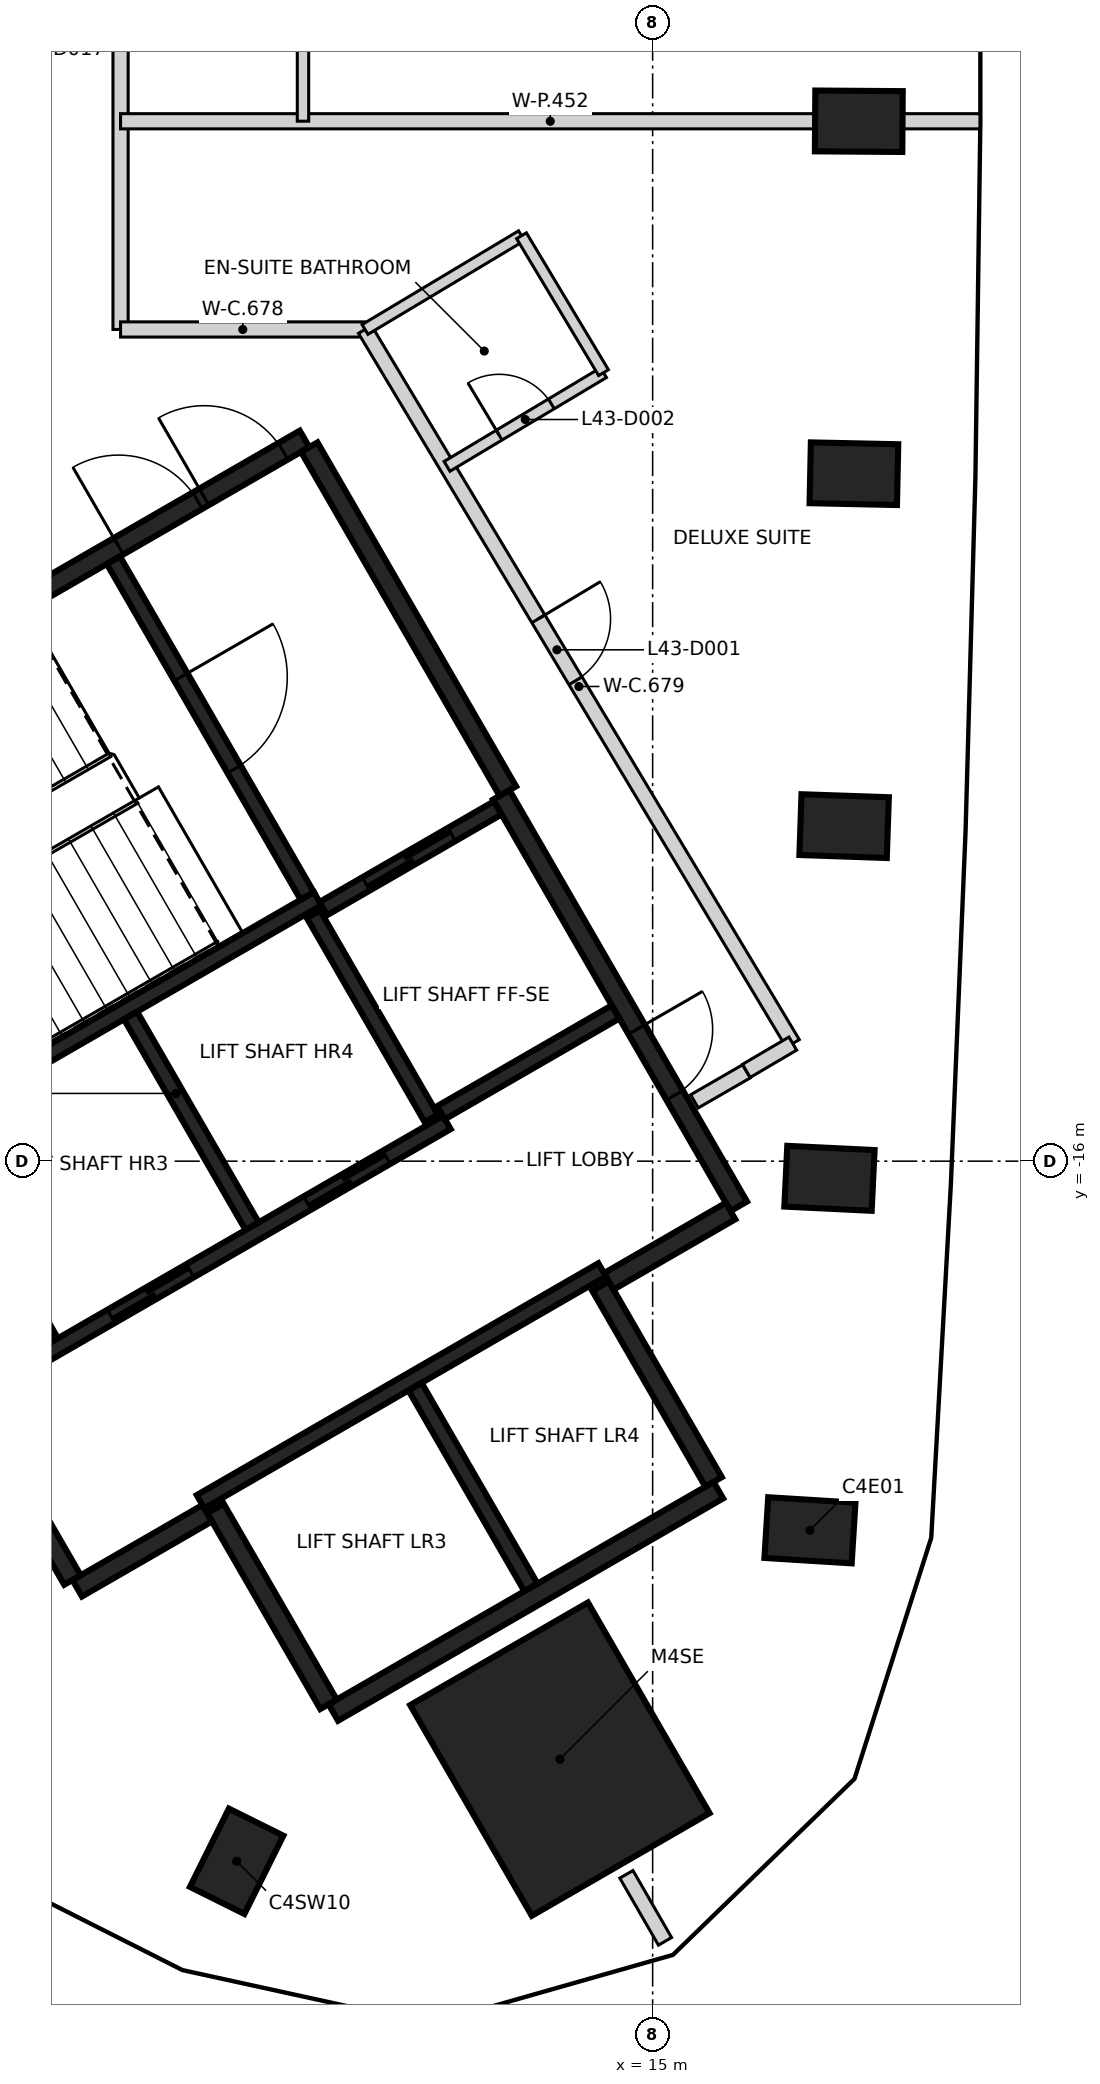
"""IFC4 building model, lengths in metres.
Left out: names, types, materials, properties, quantities, classifications, styles, units other than length and angle.
Written with IfcOpenShell. Run it as: python <this file> out.ifc"""

import sys

from ifc_helpers import new_model, si_unit, direction, frame, frame_2d, origin, origin_2d, place, context, subcontext, project, spatial, rectangle, extrude, element, fill, save


model = new_model("IFC4")
c1 = context("Model", 3, precision=1e-05, world=origin(), true_north=direction((0.0, 1.0)))
c2 = subcontext(c1, "Body", "Model", "MODEL_VIEW")
j1 = project(units=[si_unit("LENGTHUNIT", "METRE"), si_unit("PLANEANGLEUNIT", "RADIAN")], contexts=[c1])
p1 = place(None, origin())
s1 = spatial("IfcSite", under=j1, at=p1, CompositionType="ELEMENT")
p2 = place(p1, origin())
s2 = spatial("IfcBuilding", under=s1, at=p2, CompositionType="ELEMENT")
p3 = place(p2, frame((0.0, 0.0, 175.6)))
s3 = spatial("IfcBuildingStorey", under=s2, at=p3, CompositionType="ELEMENT", Elevation=175.6)
for number, where, z_axis, x_axis in (
    (1, (17.07, -20.856, -0.35), (0.0, 0.0, 1.0), (-0.998, 0.062, 0.0)),
    (2, (17.326, -16.226, -0.35), (0.0, 0.0, 1.0), (-0.999, 0.048, 0.0)),
    (3, (17.519, -11.592, -0.35), (0.0, 0.0, 1.0), (-0.999, 0.034, 0.0)),
    (4, (17.648, -6.956, -0.35), (0.0, 0.0, 1.0), (-1.0, 0.021, 0.0)),
    (5, (17.712, -2.319, -0.35), (0.0, 0.0, 1.0), (-1.0, 0.007, 0.0)),
    (6, (9.527, -25.211, -0.35), (0.0, 0.0, 1.0), (0.445, 0.895, 0.0)),
):
    element("IfcColumn", number, at=place(p3, frame(where, z_axis=z_axis, x_axis=x_axis)), inside=s3, PredefinedType="COLUMN", context=c2, shape_type="SweptSolid", body=[
        extrude(rectangle(XDim=1.15, YDim=0.8, at=origin_2d()), origin(), (0.0, 0.0, 1.0), 3.6),
    ])
p4 = place(p3, frame((13.78, -23.867, -0.35), z_axis=(0.0, 0.0, 1.0), x_axis=(-0.5, 0.866025403784, 0.0)))
e7 = element("IfcColumn", 7, at=p4, inside=s3, PredefinedType="COLUMN", context=c2, shape_type="SweptSolid", body=[
    extrude(rectangle(XDim=3.2, YDim=2.7, at=origin_2d()), origin(), (0.0, 0.0, 1.0), 3.6),
])
p5 = place(p3, frame((0.417, -12.273, 0.0), z_axis=(0.0, 0.0, 1.0), x_axis=(0.866021906294, 0.500006057782, 0.0)))
e8 = element("IfcWall", 8, at=p5, inside=s3, PredefinedType="SHEAR", context=c2, shape_type="SweptSolid", body=[
    extrude(rectangle(XDim=11.55, YDim=0.25, at=frame_2d((5.775, 0.0))), origin(), (0.0, 0.0, 1.0), 3.25),
])
p6 = place(p5, frame((10.025, 0.0, 0.0)))
e9 = element("IfcOpeningElement", 9, at=p6, cuts=e8, PredefinedType="OPENING", context=c2, shape_type="SweptSolid", body=[
    extrude(rectangle(XDim=1.2, YDim=2.1, at=frame_2d((0.6, 1.05))), frame((0.0, 0.135, 0.0), z_axis=(0.0, -1.0, 0.0), x_axis=(1.0, 0.0, 0.0)), (0.0, 0.0, 1.0), 0.27),
])
p7 = place(p5, frame((8.725, 0.0, 0.0)))
e10 = element("IfcOpeningElement", 10, at=p7, cuts=e8, PredefinedType="OPENING", context=c2, shape_type="SweptSolid", body=[
    extrude(rectangle(XDim=1.2, YDim=2.1, at=frame_2d((0.6, 1.05))), frame((0.0, 0.135, 0.0), z_axis=(0.0, -1.0, 0.0), x_axis=(1.0, 0.0, 0.0)), (0.0, 0.0, 1.0), 0.27),
])
p8 = place(p3, frame((13.008, -11.181, 0.0), z_axis=(0.0, 0.0, 1.0), x_axis=(0.500004234368, -0.866022959057, 0.0)))
e11 = element("IfcWall", 11, at=p8, inside=s3, PredefinedType="SHEAR", context=c2, shape_type="SweptSolid", body=[
    extrude(rectangle(XDim=6.25, YDim=0.25, at=frame_2d((3.125, 0.0))), origin(), (0.0, 0.0, 1.0), 3.25),
])
p9 = place(p8, frame((3.563, 0.0, 0.0)))
e12 = element("IfcOpeningElement", 12, at=p9, cuts=e11, PredefinedType="OPENING", context=c2, shape_type="SweptSolid", body=[
    extrude(rectangle(XDim=1.0, YDim=2.1, at=frame_2d((0.5, 1.05))), frame((0.0, 0.135, 0.0), z_axis=(0.0, -1.0, 0.0), x_axis=(1.0, 0.0, 0.0)), (0.0, 0.0, 1.0), 0.27),
])
p10 = place(p3, frame((15.865, -20.328, 0.0), z_axis=(0.0, 0.0, 1.0), x_axis=(-0.86602852612, -0.499994591916, 0.0)))
e13 = element("IfcWall", 13, at=p10, inside=s3, PredefinedType="SHEAR", context=c2, shape_type="SweptSolid", body=[
    extrude(rectangle(XDim=5.85, YDim=0.25, at=frame_2d((2.925, 0.0))), origin(), (0.0, 0.0, 1.0), 3.25),
])
p11 = place(p3, frame((10.483, -6.606, 0.0), z_axis=(0.0, 0.0, 1.0), x_axis=(0.49999885962, -0.866026062182, 0.0)))
e14 = element("IfcWall", 14, at=p11, inside=s3, PredefinedType="SHEAR", context=c2, shape_type="SweptSolid", body=[
    extrude(rectangle(XDim=5.225, YDim=0.25, at=frame_2d((2.612, 0.0))), origin(), (0.0, 0.0, 1.0), 3.25),
])
p12 = place(p3, frame((7.031, -18.327, 0.0), z_axis=(0.0, 0.0, 1.0), x_axis=(-0.499971222258, 0.866042017984, 0.0)))
e15 = element("IfcWall", 15, at=p12, inside=s3, PredefinedType="SHEAR", context=c2, shape_type="SweptSolid", body=[
    extrude(rectangle(XDim=3.2, YDim=0.25, at=frame_2d((1.6, 0.0))), origin(), (0.0, 0.0, 1.0), 3.25),
])
for number, where, z_axis, x_axis in (
    (16, (14.315, -17.644, 0.0), (0.0, 0.0, 1.0), (0.5, -0.866, 0.0)),
    (17, (10.736, -23.145, 0.0), (0.0, 0.0, 1.0), (-0.5, 0.866, 0.0)),
):
    element("IfcWall", number, at=place(p3, frame(where, z_axis=z_axis, x_axis=x_axis)), inside=s3, PredefinedType="SHEAR", context=c2, shape_type="SweptSolid", body=[
        extrude(rectangle(XDim=2.974, YDim=0.25, at=frame_2d((1.487, 0.0))), origin(), (0.0, 0.0, 1.0), 3.25),
    ])
p13 = place(p3, frame((9.14, -20.631, 0.0), z_axis=(0.0, 0.0, 1.0), x_axis=(-0.866043531843, -0.499968599967, 0.0)))
e18 = element("IfcWall", 18, at=p13, inside=s3, PredefinedType="SHEAR", context=c2, shape_type="SweptSolid", body=[
    extrude(rectangle(XDim=1.975, YDim=0.25, at=frame_2d((0.987, 0.0))), origin(), (0.0, 0.0, 1.0), 3.25),
])
p14 = place(p3, frame((16.025, -16.656, 0.0), z_axis=(0.0, 0.0, 1.0), x_axis=(-0.866016279763, -0.500015802937, 0.0)))
e19 = element("IfcWall", 19, at=p14, inside=s3, PredefinedType="SHEAR", context=c2, shape_type="SweptSolid", body=[
    extrude(rectangle(XDim=1.849, YDim=0.25, at=frame_2d((0.925, 0.0))), origin(), (0.0, 0.0, 1.0), 3.25),
])
p15 = place(p3, frame((7.367, -21.51, 0.0), z_axis=(0.0, 0.0, 1.0), x_axis=(-0.499983108224, 0.866035156036, 0.0)))
e20 = element("IfcWall", 20, at=p15, inside=s3, PredefinedType="SHEAR", context=c2, shape_type="SweptSolid", body=[
    extrude(rectangle(XDim=1.865, YDim=0.25, at=frame_2d((0.932, 0.0))), origin(), (0.0, 0.0, 1.0), 3.25),
])
p16 = place(p3, frame((9.052, -20.48, 0.0), z_axis=(0.0, 0.0, 1.0), x_axis=(0.866030299012, 0.499991521122, 0.0)))
e21 = element("IfcWall", 21, at=p16, inside=s3, PredefinedType="SHEAR", context=c2, shape_type="SweptSolid", body=[
    extrude(rectangle(XDim=6.1, YDim=0.2, at=frame_2d((3.05, 0.0))), origin(), (0.0, 0.0, 1.0), 3.25),
])
p17 = place(p3, frame((5.526, -15.472, 0.0), z_axis=(0.0, 0.0, 1.0), x_axis=(0.866041752167, 0.499971682701, 0.0)))
e22 = element("IfcWall", 22, at=p17, inside=s3, PredefinedType="SHEAR", context=c2, shape_type="SweptSolid", body=[
    extrude(rectangle(XDim=5.851, YDim=0.2, at=frame_2d((2.925, 0.0))), origin(), (0.0, 0.0, 1.0), 3.25),
])
p18 = place(p3, frame((12.293, -15.491, 0.0), z_axis=(0.0, 0.0, 1.0), x_axis=(-0.866030299012, -0.499991521122, 0.0)))
e23 = element("IfcWall", 23, at=p18, inside=s3, PredefinedType="SHEAR", context=c2, shape_type="SweptSolid", body=[
    extrude(rectangle(XDim=6.1, YDim=0.2, at=frame_2d((3.05, 0.0))), origin(), (0.0, 0.0, 1.0), 3.25),
])
p19 = place(p18, frame((3.9, 0.0, 0.0)))
e24 = element("IfcOpeningElement", 24, at=p19, cuts=e23, PredefinedType="OPENING", context=c2, shape_type="SweptSolid", body=[
    extrude(rectangle(XDim=1.2, YDim=2.1, at=frame_2d((0.6, 1.05))), frame((0.0, 0.11, 0.0), z_axis=(0.0, -1.0, 0.0), x_axis=(1.0, 0.0, 0.0)), (0.0, 0.0, 1.0), 0.22),
])
p20 = place(p18, frame((0.918, 0.0, 0.0)))
e25 = element("IfcOpeningElement", 25, at=p20, cuts=e23, PredefinedType="OPENING", context=c2, shape_type="SweptSolid", body=[
    extrude(rectangle(XDim=1.2, YDim=2.1, at=frame_2d((0.6, 1.05))), frame((0.0, 0.11, 0.0), z_axis=(0.0, -1.0, 0.0), x_axis=(1.0, 0.0, 0.0)), (0.0, 0.0, 1.0), 0.22),
])
p21 = place(p3, frame((7.906, -8.094, 0.0), z_axis=(0.0, 0.0, 1.0), x_axis=(0.500027839223, -0.866009330205, 0.0)))
e26 = element("IfcWall", 26, at=p21, inside=s3, PredefinedType="SHEAR", context=c2, shape_type="SweptSolid", body=[
    extrude(rectangle(XDim=5.098, YDim=0.2, at=frame_2d((2.549, 0.0))), origin(), (0.0, 0.0, 1.0), 3.25),
])
p22 = place(p21, frame((1.774, 0.0, 0.0)))
e27 = element("IfcOpeningElement", 27, at=p22, cuts=e26, PredefinedType="OPENING", context=c2, shape_type="SweptSolid", body=[
    extrude(rectangle(XDim=1.4, YDim=2.1, at=frame_2d((0.7, 1.05))), frame((0.0, 0.11, 0.0), z_axis=(0.0, -1.0, 0.0), x_axis=(1.0, 0.0, 0.0)), (0.0, 0.0, 1.0), 0.22),
])
p23 = place(p3, frame((8.132, -14.084, 0.0), z_axis=(0.0, 0.0, 1.0), x_axis=(0.499997778408, -0.866026686418, 0.0)))
e28 = element("IfcWall", 28, at=p23, inside=s3, PredefinedType="SHEAR", context=c2, shape_type="SweptSolid", body=[
    extrude(rectangle(XDim=3.198, YDim=0.2, at=frame_2d((1.599, 0.0))), origin(), (0.0, 0.0, 1.0), 3.25),
])
p24 = place(p3, frame((11.875, -18.967, 0.0), z_axis=(0.0, 0.0, 1.0), x_axis=(0.49998131003, -0.866036194175, 0.0)))
e29 = element("IfcWall", 29, at=p24, inside=s3, PredefinedType="SHEAR", context=c2, shape_type="SweptSolid", body=[
    extrude(rectangle(XDim=3.048, YDim=0.2, at=frame_2d((1.524, 0.0))), origin(), (0.0, 0.0, 1.0), 3.25),
])
p25 = place(p3, frame((12.088, -15.437, 0.0), z_axis=(0.0, 0.0, 1.0), x_axis=(-0.500026960575, 0.86600983753, 0.0)))
e30 = element("IfcWall", 30, at=p25, inside=s3, PredefinedType="SHEAR", context=c2, shape_type="SweptSolid", body=[
    extrude(rectangle(XDim=3.1, YDim=0.2, at=frame_2d((1.55, 0.0))), origin(), (0.0, 0.0, 1.0), 3.25),
])
p26 = place(p3, frame((10.666, -12.678, 0.0), z_axis=(0.0, 0.0, 1.0), x_axis=(0.866018407898, 0.500012117035, 0.0)))
e31 = element("IfcWall", 31, at=p26, inside=s3, PredefinedType="SHEAR", context=c2, shape_type="SweptSolid", body=[
    extrude(rectangle(XDim=2.651, YDim=0.2, at=frame_2d((1.325, 0.0))), origin(), (0.0, 0.0, 1.0), 3.25),
])
p27 = place(p26, frame((0.652, 0.0, 0.0)))
e32 = element("IfcOpeningElement", 32, at=p27, cuts=e31, PredefinedType="OPENING", context=c2, shape_type="SweptSolid", body=[
    extrude(rectangle(XDim=1.3, YDim=2.1, at=frame_2d((0.65, 1.05))), frame((0.0, 0.11, 0.0), z_axis=(0.0, -1.0, 0.0), x_axis=(1.0, 0.0, 0.0)), (0.0, 0.0, 1.0), 0.22),
])
p28 = place(p3, frame((14.512, -14.037, 0.0), z_axis=(0.0, 0.0, 1.0), x_axis=(-0.866018407898, -0.500012117035, 0.0)))
e33 = element("IfcWall", 33, at=p28, inside=s3, PredefinedType="SHEAR", context=c2, shape_type="SweptSolid", body=[
    extrude(rectangle(XDim=2.651, YDim=0.2, at=frame_2d((1.325, 0.0))), origin(), (0.0, 0.0, 1.0), 3.25),
])
p29 = place(p3, frame((8.0, -5.058, 0.0), z_axis=(0.0, 0.0, 1.0), x_axis=(0.0, 1.0, 0.0)))
e34 = element("IfcWall", 34, at=p29, inside=s3, PredefinedType="PARTITIONING", context=c2, shape_type="SweptSolid", body=[
    extrude(rectangle(XDim=12.74, YDim=0.2, at=frame_2d((6.37, 0.0))), origin(), (0.0, 0.0, 1.0), 3.25),
])
p30 = place(p29, frame((9.508, 0.0, 0.0)))
e35 = element("IfcOpeningElement", 35, at=p30, cuts=e34, PredefinedType="OPENING", context=c2, shape_type="SweptSolid", body=[
    extrude(rectangle(XDim=0.95, YDim=2.1, at=frame_2d((0.475, 1.05))), frame((0.0, 0.11, 0.0), z_axis=(0.0, -1.0, 0.0), x_axis=(1.0, 0.0, 0.0)), (0.0, 0.0, 1.0), 0.22),
])
p31 = place(p3, frame((8.0, -5.058, 0.0), z_axis=(0.0, 0.0, 1.0), x_axis=(1.0, 0.0, 0.0)))
e36 = element("IfcWall", 36, at=p31, inside=s3, PredefinedType="PARTITIONING", context=c2, shape_type="SweptSolid", body=[
    extrude(rectangle(XDim=3.216, YDim=0.2, at=frame_2d((1.608, 0.0))), origin(), (0.0, 0.0, 1.0), 3.25),
])
p32 = place(p3, frame((11.216, -5.058, 0.0), z_axis=(0.0, 0.0, 1.0), x_axis=(0.51393500197, -0.857829128527, 0.0)))
e37 = element("IfcWall", 37, at=p32, inside=s3, PredefinedType="PARTITIONING", context=c2, shape_type="SweptSolid", body=[
    extrude(rectangle(XDim=10.951, YDim=0.2, at=frame_2d((5.475, 0.0))), origin(), (0.0, 0.0, 1.0), 3.25),
])
p33 = place(p32, frame((4.438, 0.0, 0.0)))
e38 = element("IfcOpeningElement", 38, at=p33, cuts=e37, PredefinedType="OPENING", context=c2, shape_type="SweptSolid", body=[
    extrude(rectangle(XDim=0.95, YDim=2.1, at=frame_2d((0.475, 1.05))), frame((0.0, 0.11, 0.0), z_axis=(0.0, -1.0, 0.0), x_axis=(1.0, 0.0, 0.0)), (0.0, 0.0, 1.0), 0.22),
])
p34 = place(p3, frame((15.55, -15.213, 0.0), z_axis=(0.0, 0.0, 1.0), x_axis=(0.865989998118, 0.500061319399, 0.0)))
e39 = element("IfcWall", 39, at=p34, inside=s3, PredefinedType="PARTITIONING", context=c2, shape_type="SweptSolid", body=[
    extrude(rectangle(XDim=0.79, YDim=0.2, at=frame_2d((0.395, 0.0))), origin(), (0.0, 0.0, 1.0), 3.25),
])
p35 = place(p3, frame((16.233, -14.812, 0.0), z_axis=(0.0, 0.0, 1.0), x_axis=(0.862137800155, 0.506673872964, 0.0)))
e40 = element("IfcWall", 40, at=p35, inside=s3, PredefinedType="PARTITIONING", context=c2, shape_type="SweptSolid", body=[
    extrude(rectangle(XDim=0.709, YDim=0.2, at=frame_2d((0.354, 0.0))), origin(), (0.0, 0.0, 1.0), 3.25),
])
p36 = place(p3, frame((8.0, -2.319, 0.0), z_axis=(0.0, 0.0, 1.0), x_axis=(1.0, 0.0, 0.0)))
e41 = element("IfcWall", 41, at=p36, inside=s3, PredefinedType="PARTITIONING", context=c2, shape_type="SweptSolid", body=[
    extrude(rectangle(XDim=11.306, YDim=0.2, at=frame_2d((5.653, 0.0))), origin(), (0.0, 0.0, 1.0), 3.25),
])
p37 = place(p3, frame((14.655, -25.382, 0.0), z_axis=(0.0, 0.0, 1.0), x_axis=(0.49921010478, -0.86648096995, 0.0)))
e42 = element("IfcWall", 42, at=p37, inside=s3, PredefinedType="PARTITIONING", context=c2, shape_type="SweptSolid", body=[
    extrude(rectangle(XDim=1.018, YDim=0.2, at=frame_2d((0.509, 0.0))), origin(), (0.0, 0.0, 1.0), 3.25),
])
p38 = place(p3, frame((10.4, -2.318, 0.0), z_axis=(0.0, 0.0, 1.0), x_axis=(0.0, 1.0, 0.0)))
e43 = element("IfcWall", 43, at=p38, inside=s3, PredefinedType="PARTITIONING", context=c2, shape_type="SweptSolid", body=[
    extrude(rectangle(XDim=2.097, YDim=0.15, at=frame_2d((1.049, 0.0))), origin(), (0.0, 0.0, 1.0), 3.25),
])
p39 = place(p3, frame((11.216, -5.058, 0.0), z_axis=(0.0, 0.0, 1.0), x_axis=(0.85788762415, 0.51383735202, 0.0)))
e44 = element("IfcWall", 44, at=p39, inside=s3, PredefinedType="PARTITIONING", context=c2, shape_type="SweptSolid", body=[
    extrude(rectangle(XDim=2.4, YDim=0.15, at=frame_2d((1.2, 0.0))), origin(), (0.0, 0.0, 1.0), 3.25),
])
p40 = place(p3, frame((12.295, -6.859, 0.0), z_axis=(0.0, 0.0, 1.0), x_axis=(0.857959316897, 0.513717636985, 0.0)))
e45 = element("IfcWall", 45, at=p40, inside=s3, PredefinedType="PARTITIONING", context=c2, shape_type="SweptSolid", body=[
    extrude(rectangle(XDim=2.4, YDim=0.15, at=frame_2d((1.2, 0.0))), origin(), (0.0, 0.0, 1.0), 3.25),
])
p41 = place(p40, frame((0.8, 0.0, 0.0)))
e46 = element("IfcOpeningElement", 46, at=p41, cuts=e45, PredefinedType="OPENING", context=c2, shape_type="SweptSolid", body=[
    extrude(rectangle(XDim=0.8, YDim=2.1, at=frame_2d((0.4, 1.05))), frame((0.0, 0.085, 0.0), z_axis=(0.0, -1.0, 0.0), x_axis=(1.0, 0.0, 0.0)), (0.0, 0.0, 1.0), 0.17),
])
p42 = place(p3, frame((13.275, -3.825, 0.0), z_axis=(0.0, 0.0, 1.0), x_axis=(0.513965548914, -0.857810826773, 0.0)))
e47 = element("IfcWall", 47, at=p42, inside=s3, PredefinedType="PARTITIONING", context=c2, shape_type="SweptSolid", body=[
    extrude(rectangle(XDim=2.1, YDim=0.15, at=frame_2d((1.05, 0.0))), origin(), (0.0, 0.0, 1.0), 3.25),
])
p43 = place(p27, origin())
e48 = element("IfcDoor", 48, at=p43, inside=s3, OperationType="SLIDING_TO_LEFT", PredefinedType="DOOR", context=c2, shape_type="SweptSolid", body=[
    extrude(rectangle(XDim=1.3, YDim=2.1, at=frame_2d((0.65, 1.05))), frame((0.0, 0.025, 0.0), z_axis=(0.0, -1.0, 0.0), x_axis=(1.0, 0.0, 0.0)), (0.0, 0.0, 1.0), 0.05),
])
fill(e32, e48)
p44 = place(p19, origin())
e49 = element("IfcDoor", 49, at=p44, inside=s3, OperationType="DOUBLE_DOOR_SLIDING", PredefinedType="DOOR", context=c2, shape_type="SweptSolid", body=[
    extrude(rectangle(XDim=1.2, YDim=2.1, at=frame_2d((0.6, 1.05))), frame((0.0, 0.025, 0.0), z_axis=(0.0, -1.0, 0.0), x_axis=(1.0, 0.0, 0.0)), (0.0, 0.0, 1.0), 0.05),
])
fill(e24, e49)
p45 = place(p20, origin())
e50 = element("IfcDoor", 50, at=p45, inside=s3, OperationType="DOUBLE_DOOR_SLIDING", PredefinedType="DOOR", context=c2, shape_type="SweptSolid", body=[
    extrude(rectangle(XDim=1.2, YDim=2.1, at=frame_2d((0.6, 1.05))), frame((0.0, 0.025, 0.0), z_axis=(0.0, -1.0, 0.0), x_axis=(1.0, 0.0, 0.0)), (0.0, 0.0, 1.0), 0.05),
])
fill(e25, e50)
p46 = place(p9, origin())
e51 = element("IfcDoor", 51, at=p46, inside=s3, OperationType="SINGLE_SWING_LEFT", PredefinedType="DOOR", context=c2, shape_type="SweptSolid", body=[
    extrude(rectangle(XDim=1.0, YDim=2.1, at=frame_2d((0.5, 1.05))), frame((0.0, 0.025, 0.0), z_axis=(0.0, -1.0, 0.0), x_axis=(1.0, 0.0, 0.0)), (0.0, 0.0, 1.0), 0.05),
])
fill(e12, e51)
p47 = place(p6, origin())
e52 = element("IfcDoor", 52, at=p47, inside=s3, OperationType="SINGLE_SWING_LEFT", PredefinedType="DOOR", context=c2, shape_type="SweptSolid", body=[
    extrude(rectangle(XDim=1.2, YDim=2.1, at=frame_2d((0.6, 1.05))), frame((0.0, 0.025, 0.0), z_axis=(0.0, -1.0, 0.0), x_axis=(1.0, 0.0, 0.0)), (0.0, 0.0, 1.0), 0.05),
])
fill(e9, e52)
p48 = place(p7, origin())
e53 = element("IfcDoor", 53, at=p48, inside=s3, OperationType="SINGLE_SWING_RIGHT", PredefinedType="DOOR", context=c2, shape_type="SweptSolid", body=[
    extrude(rectangle(XDim=1.2, YDim=2.1, at=frame_2d((0.6, 1.05))), frame((0.0, 0.025, 0.0), z_axis=(0.0, -1.0, 0.0), x_axis=(1.0, 0.0, 0.0)), (0.0, 0.0, 1.0), 0.05),
])
fill(e10, e53)
p49 = place(p22, origin())
e54 = element("IfcDoor", 54, at=p49, inside=s3, OperationType="SINGLE_SWING_LEFT", PredefinedType="DOOR", context=c2, shape_type="SweptSolid", body=[
    extrude(rectangle(XDim=1.4, YDim=2.1, at=frame_2d((0.7, 1.05))), frame((0.0, 0.025, 0.0), z_axis=(0.0, -1.0, 0.0), x_axis=(1.0, 0.0, 0.0)), (0.0, 0.0, 1.0), 0.05),
])
fill(e27, e54)
p50 = place(p33, origin())
e55 = element("IfcDoor", 55, at=p50, inside=s3, OperationType="SINGLE_SWING_LEFT", PredefinedType="DOOR", context=c2, shape_type="SweptSolid", body=[
    extrude(rectangle(XDim=0.95, YDim=2.1, at=frame_2d((0.475, 1.05))), frame((0.0, 0.025, 0.0), z_axis=(0.0, -1.0, 0.0), x_axis=(1.0, 0.0, 0.0)), (0.0, 0.0, 1.0), 0.05),
])
fill(e38, e55)
p51 = place(p41, frame((0.8, 0.0, 0.0), z_axis=(0.0, 0.0, 1.0), x_axis=(-1.0, 0.0, 0.0)))
e56 = element("IfcDoor", 56, at=p51, inside=s3, OperationType="SINGLE_SWING_LEFT", PredefinedType="DOOR", context=c2, shape_type="SweptSolid", body=[
    extrude(rectangle(XDim=0.8, YDim=2.1, at=frame_2d((0.4, 1.05))), frame((0.0, 0.025, 0.0), z_axis=(0.0, -1.0, 0.0), x_axis=(1.0, 0.0, 0.0)), (0.0, 0.0, 1.0), 0.05),
])
fill(e46, e56)
save(model, sys.argv[1])
